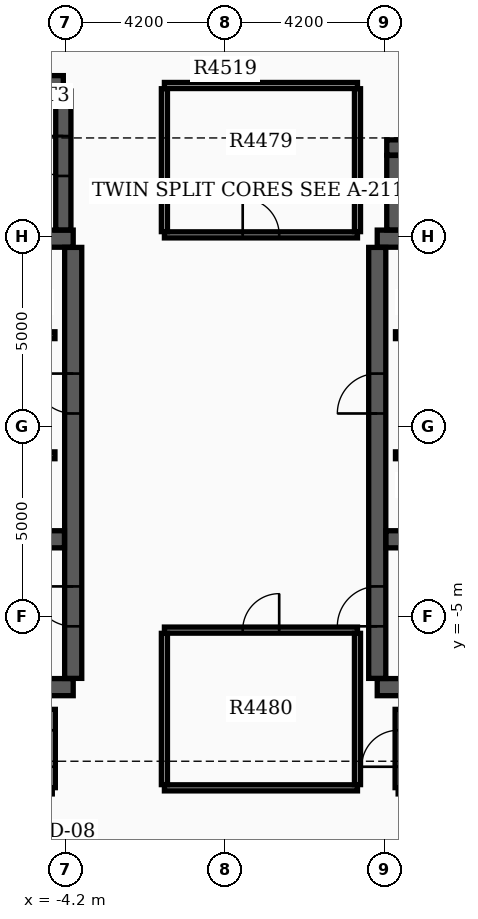
"""IFC4 building model, lengths in metres.
Left out: names, types, materials, properties, quantities, classifications, styles, units other than length and angle.
Written with IfcOpenShell. Run it as: python <this file> out.ifc"""

import sys

from ifc_helpers import new_model, si_unit, direction, frame, frame_2d, origin, place, context, subcontext, project, spatial, rectangle, extrude, element, fill, save


model = new_model("IFC4")
c1 = context("Model", 3, precision=1e-05, world=origin(), true_north=direction((0.0, 1.0)))
c2 = subcontext(c1, "Body", "Model", "MODEL_VIEW")
j1 = project(units=[si_unit("LENGTHUNIT", "METRE"), si_unit("PLANEANGLEUNIT", "RADIAN")], contexts=[c1])
p1 = place(None, origin())
s1 = spatial("IfcSite", under=j1, at=p1, CompositionType="ELEMENT")
p2 = place(p1, origin())
s2 = spatial("IfcBuilding", under=s1, at=p2, CompositionType="ELEMENT")
p3 = place(p2, frame((0.0, 0.0, 281.1)))
s3 = spatial("IfcBuildingStorey", under=s2, at=p3, CompositionType="ELEMENT", Elevation=281.1)
for number, where, z_axis, x_axis in (
    (1, (-12.4, -6.85, 0.0), (0.0, 0.0, 1.0), (1.0, 0.0, 0.0)),
    (2, (-12.4, 4.95, 0.0), (0.0, 0.0, 1.0), (1.0, 0.0, 0.0)),
):
    element("IfcWall", number, at=place(p3, frame(where, z_axis=z_axis, x_axis=x_axis)), inside=s3, PredefinedType="SHEAR", context=c2, shape_type="SweptSolid", body=[
        extrude(rectangle(XDim=8.4, YDim=0.45, at=frame_2d((4.2, 0.0))), origin(), (0.0, 0.0, 1.0), 3.7),
    ])
p4 = place(p3, frame((-4.0, -6.62, 0.0), z_axis=(0.0, 0.0, 1.0), x_axis=(0.0, 1.0, 0.0)))
e3 = element("IfcWall", 3, at=p4, inside=s3, PredefinedType="SHEAR", context=c2, shape_type="SweptSolid", body=[
    extrude(rectangle(XDim=11.34, YDim=0.45, at=frame_2d((5.67, 0.0))), origin(), (0.0, 0.0, 1.0), 3.7),
])
p5 = place(p4, frame((1.37, 0.0, 0.0)))
e4 = element("IfcOpeningElement", 4, at=p5, cuts=e3, PredefinedType="OPENING", context=c2, shape_type="SweptSolid", body=[
    extrude(rectangle(XDim=1.05, YDim=2.15, at=frame_2d((0.525, 1.075))), frame((0.0, 0.235, 0.0), z_axis=(0.0, -1.0, 0.0), x_axis=(1.0, 0.0, 0.0)), (0.0, 0.0, 1.0), 0.47),
])
p6 = place(p4, frame((6.97, 0.0, 0.0)))
e5 = element("IfcOpeningElement", 5, at=p6, cuts=e3, PredefinedType="OPENING", context=c2, shape_type="SweptSolid", body=[
    extrude(rectangle(XDim=1.05, YDim=2.15, at=frame_2d((0.525, 1.075))), frame((0.0, 0.235, 0.0), z_axis=(0.0, -1.0, 0.0), x_axis=(1.0, 0.0, 0.0)), (0.0, 0.0, 1.0), 0.47),
])
p7 = place(p3, frame((-12.17, -2.96, 0.0), z_axis=(0.0, 0.0, 1.0), x_axis=(1.0, 0.0, 0.0)))
e6 = element("IfcWall", 6, at=p7, inside=s3, PredefinedType="SHEAR", context=c2, shape_type="SweptSolid", body=[
    extrude(rectangle(XDim=7.94, YDim=0.45, at=frame_2d((3.97, 0.0))), origin(), (0.0, 0.0, 1.0), 3.7),
])
for number, where, z_axis, x_axis in (
    (7, (4.0, -6.85, 0.0), (0.0, 0.0, 1.0), (1.0, 0.0, 0.0)),
    (8, (4.0, 4.95, 0.0), (0.0, 0.0, 1.0), (1.0, 0.0, 0.0)),
):
    element("IfcWall", number, at=place(p3, frame(where, z_axis=z_axis, x_axis=x_axis)), inside=s3, PredefinedType="SHEAR", context=c2, shape_type="SweptSolid", body=[
        extrude(rectangle(XDim=8.4, YDim=0.45, at=frame_2d((4.2, 0.0))), origin(), (0.0, 0.0, 1.0), 3.7),
    ])
p8 = place(p3, frame((4.0, -6.62, 0.0), z_axis=(0.0, 0.0, 1.0), x_axis=(0.0, 1.0, 0.0)))
e9 = element("IfcWall", 9, at=p8, inside=s3, PredefinedType="SHEAR", context=c2, shape_type="SweptSolid", body=[
    extrude(rectangle(XDim=11.34, YDim=0.45, at=frame_2d((5.67, 0.0))), origin(), (0.0, 0.0, 1.0), 3.7),
])
p9 = place(p8, frame((1.37, 0.0, 0.0)))
e10 = element("IfcOpeningElement", 10, at=p9, cuts=e9, PredefinedType="OPENING", context=c2, shape_type="SweptSolid", body=[
    extrude(rectangle(XDim=1.05, YDim=2.15, at=frame_2d((0.525, 1.075))), frame((0.0, 0.235, 0.0), z_axis=(0.0, -1.0, 0.0), x_axis=(1.0, 0.0, 0.0)), (0.0, 0.0, 1.0), 0.47),
])
p10 = place(p8, frame((6.97, 0.0, 0.0)))
e11 = element("IfcOpeningElement", 11, at=p10, cuts=e9, PredefinedType="OPENING", context=c2, shape_type="SweptSolid", body=[
    extrude(rectangle(XDim=1.05, YDim=2.15, at=frame_2d((0.525, 1.075))), frame((0.0, 0.235, 0.0), z_axis=(0.0, -1.0, 0.0), x_axis=(1.0, 0.0, 0.0)), (0.0, 0.0, 1.0), 0.47),
])
p11 = place(p3, frame((4.23, -2.96, 0.0), z_axis=(0.0, 0.0, 1.0), x_axis=(1.0, 0.0, 0.0)))
e12 = element("IfcWall", 12, at=p11, inside=s3, PredefinedType="SHEAR", context=c2, shape_type="SweptSolid", body=[
    extrude(rectangle(XDim=7.94, YDim=0.45, at=frame_2d((3.97, 0.0))), origin(), (0.0, 0.0, 1.0), 3.7),
])
p12 = place(p3, frame((-12.22, 9.04, 0.0), z_axis=(0.0, 0.0, 1.0), x_axis=(1.0, 0.0, 0.0)))
e13 = element("IfcWall", 13, at=p12, inside=s3, PredefinedType="SHEAR", context=c2, shape_type="SweptSolid", body=[
    extrude(rectangle(XDim=7.96, YDim=0.4, at=frame_2d((3.98, 0.0))), origin(), (0.0, 0.0, 1.0), 3.7),
])
p13 = place(p3, frame((-4.26, 5.18, 0.0), z_axis=(0.0, 0.0, 1.0), x_axis=(0.0, 1.0, 0.0)))
e14 = element("IfcWall", 14, at=p13, inside=s3, PredefinedType="SHEAR", context=c2, shape_type="SweptSolid", body=[
    extrude(rectangle(XDim=3.655, YDim=0.4, at=frame_2d((1.828, 0.0))), origin(), (0.0, 0.0, 1.0), 3.7),
])
p14 = place(p13, frame((1.42, 0.0, 0.0)))
e15 = element("IfcOpeningElement", 15, at=p14, cuts=e14, PredefinedType="OPENING", context=c2, shape_type="SweptSolid", body=[
    extrude(rectangle(XDim=1.05, YDim=2.15, at=frame_2d((0.525, 1.075))), frame((0.0, 0.21, 0.0), z_axis=(0.0, -1.0, 0.0), x_axis=(1.0, 0.0, 0.0)), (0.0, 0.0, 1.0), 0.42),
])
p15 = place(p3, frame((4.45, 5.18, 0.0), z_axis=(0.0, 0.0, 1.0), x_axis=(0.0, 1.0, 0.0)))
e16 = element("IfcWall", 16, at=p15, inside=s3, PredefinedType="SHEAR", context=c2, shape_type="SweptSolid", body=[
    extrude(rectangle(XDim=1.96, YDim=0.4, at=frame_2d((0.98, 0.0))), origin(), (0.0, 0.0, 1.0), 3.7),
])
p16 = place(p3, frame((4.25, 7.35, 0.0), z_axis=(0.0, 0.0, 1.0), x_axis=(1.0, 0.0, 0.0)))
e17 = element("IfcWall", 17, at=p16, inside=s3, PredefinedType="SHEAR", context=c2, shape_type="SweptSolid", body=[
    extrude(rectangle(XDim=5.4, YDim=0.4, at=frame_2d((2.7, 0.0))), origin(), (0.0, 0.0, 1.0), 3.7),
])
p17 = place(p3, frame((-11.9, 2.41, 0.0), z_axis=(0.0, 0.0, 1.0), x_axis=(1.0, 0.0, 0.0)))
e18 = element("IfcWall", 18, at=p17, inside=s3, PredefinedType="SOLIDWALL", context=c2, shape_type="SweptSolid", body=[
    extrude(rectangle(XDim=7.42, YDim=0.18, at=frame_2d((3.71, 0.0))), origin(), (0.0, 0.0, 1.0), 3.17),
])
p18 = place(p17, frame((0.55, 0.0, 0.0)))
e19 = element("IfcOpeningElement", 19, at=p18, cuts=e18, PredefinedType="OPENING", context=c2, shape_type="SweptSolid", body=[
    extrude(rectangle(XDim=1.1, YDim=2.15, at=frame_2d((0.55, 1.075))), frame((0.0, 0.1, 0.0), z_axis=(0.0, -1.0, 0.0), x_axis=(1.0, 0.0, 0.0)), (0.0, 0.0, 1.0), 0.2),
])
p19 = place(p17, frame((4.9, 0.0, 0.0)))
e20 = element("IfcOpeningElement", 20, at=p19, cuts=e18, PredefinedType="OPENING", context=c2, shape_type="SweptSolid", body=[
    extrude(rectangle(XDim=0.88, YDim=2.1, at=frame_2d((0.44, 1.05))), frame((0.0, 0.1, 0.0), z_axis=(0.0, -1.0, 0.0), x_axis=(1.0, 0.0, 0.0)), (0.0, 0.0, 1.0), 0.2),
])
p20 = place(p3, frame((4.48, 2.41, 0.0), z_axis=(0.0, 0.0, 1.0), x_axis=(1.0, 0.0, 0.0)))
e21 = element("IfcWall", 21, at=p20, inside=s3, PredefinedType="SOLIDWALL", context=c2, shape_type="SweptSolid", body=[
    extrude(rectangle(XDim=7.42, YDim=0.18, at=frame_2d((3.71, 0.0))), origin(), (0.0, 0.0, 1.0), 3.17),
])
p21 = place(p20, frame((5.67, 0.0, 0.0)))
e22 = element("IfcOpeningElement", 22, at=p21, cuts=e21, PredefinedType="OPENING", context=c2, shape_type="SweptSolid", body=[
    extrude(rectangle(XDim=1.1, YDim=2.15, at=frame_2d((0.55, 1.075))), frame((0.0, 0.1, 0.0), z_axis=(0.0, -1.0, 0.0), x_axis=(1.0, 0.0, 0.0)), (0.0, 0.0, 1.0), 0.2),
])
p22 = place(p20, frame((1.6, 0.0, 0.0)))
e23 = element("IfcOpeningElement", 23, at=p22, cuts=e21, PredefinedType="OPENING", context=c2, shape_type="SweptSolid", body=[
    extrude(rectangle(XDim=0.88, YDim=2.1, at=frame_2d((0.44, 1.05))), frame((0.0, 0.1, 0.0), z_axis=(0.0, -1.0, 0.0), x_axis=(1.0, 0.0, 0.0)), (0.0, 0.0, 1.0), 0.2),
])
p23 = place(p3, frame((-11.9, -0.75, 0.0), z_axis=(0.0, 0.0, 1.0), x_axis=(1.0, 0.0, 0.0)))
e24 = element("IfcWall", 24, at=p23, inside=s3, PredefinedType="SOLIDWALL", context=c2, shape_type="SweptSolid", body=[
    extrude(rectangle(XDim=7.42, YDim=0.18, at=frame_2d((3.71, 0.0))), origin(), (0.0, 0.0, 1.0), 3.17),
])
p24 = place(p23, frame((5.75, 0.0, 0.0)))
e25 = element("IfcOpeningElement", 25, at=p24, cuts=e24, PredefinedType="OPENING", context=c2, shape_type="SweptSolid", body=[
    extrude(rectangle(XDim=1.1, YDim=2.15, at=frame_2d((0.55, 1.075))), frame((0.0, 0.1, 0.0), z_axis=(0.0, -1.0, 0.0), x_axis=(1.0, 0.0, 0.0)), (0.0, 0.0, 1.0), 0.2),
])
p25 = place(p23, frame((1.6, 0.0, 0.0)))
e26 = element("IfcOpeningElement", 26, at=p25, cuts=e24, PredefinedType="OPENING", context=c2, shape_type="SweptSolid", body=[
    extrude(rectangle(XDim=0.88, YDim=2.1, at=frame_2d((0.44, 1.05))), frame((0.0, 0.1, 0.0), z_axis=(0.0, -1.0, 0.0), x_axis=(1.0, 0.0, 0.0)), (0.0, 0.0, 1.0), 0.2),
])
p26 = place(p3, frame((4.48, -0.75, 0.0), z_axis=(0.0, 0.0, 1.0), x_axis=(1.0, 0.0, 0.0)))
e27 = element("IfcWall", 27, at=p26, inside=s3, PredefinedType="SOLIDWALL", context=c2, shape_type="SweptSolid", body=[
    extrude(rectangle(XDim=7.42, YDim=0.18, at=frame_2d((3.71, 0.0))), origin(), (0.0, 0.0, 1.0), 3.17),
])
p27 = place(p26, frame((3.92, 0.0, 0.0)))
e28 = element("IfcOpeningElement", 28, at=p27, cuts=e27, PredefinedType="OPENING", context=c2, shape_type="SweptSolid", body=[
    extrude(rectangle(XDim=1.1, YDim=2.15, at=frame_2d((0.55, 1.075))), frame((0.0, 0.1, 0.0), z_axis=(0.0, -1.0, 0.0), x_axis=(1.0, 0.0, 0.0)), (0.0, 0.0, 1.0), 0.2),
])
p28 = place(p26, frame((5.82, 0.0, 0.0)))
e29 = element("IfcOpeningElement", 29, at=p28, cuts=e27, PredefinedType="OPENING", context=c2, shape_type="SweptSolid", body=[
    extrude(rectangle(XDim=1.1, YDim=2.15, at=frame_2d((0.55, 1.075))), frame((0.0, 0.1, 0.0), z_axis=(0.0, -1.0, 0.0), x_axis=(1.0, 0.0, 0.0)), (0.0, 0.0, 1.0), 0.2),
])
p29 = place(p26, frame((1.6, 0.0, 0.0)))
e30 = element("IfcOpeningElement", 30, at=p29, cuts=e27, PredefinedType="OPENING", context=c2, shape_type="SweptSolid", body=[
    extrude(rectangle(XDim=0.88, YDim=2.1, at=frame_2d((0.44, 1.05))), frame((0.0, 0.1, 0.0), z_axis=(0.0, -1.0, 0.0), x_axis=(1.0, 0.0, 0.0)), (0.0, 0.0, 1.0), 0.2),
])
p30 = place(p3, frame((-1.6, 5.05, 0.0), z_axis=(0.0, 0.0, 1.0), x_axis=(1.0, 0.0, 0.0)))
e31 = element("IfcWall", 31, at=p30, inside=s3, PredefinedType="PARTITIONING", context=c2, shape_type="SweptSolid", body=[
    extrude(rectangle(XDim=5.08, YDim=0.16, at=frame_2d((2.54, 0.0))), origin(), (0.0, 0.0, 1.0), 3.17),
])
p31 = place(p30, frame((2.06, 0.0, 0.0)))
e32 = element("IfcOpeningElement", 32, at=p31, cuts=e31, PredefinedType="OPENING", context=c2, shape_type="SweptSolid", body=[
    extrude(rectangle(XDim=0.96, YDim=2.15, at=frame_2d((0.48, 1.075))), frame((0.0, 0.09, 0.0), z_axis=(0.0, -1.0, 0.0), x_axis=(1.0, 0.0, 0.0)), (0.0, 0.0, 1.0), 0.18),
])
p32 = place(p3, frame((-1.6, 8.98, 0.0), z_axis=(0.0, 0.0, 1.0), x_axis=(1.0, 0.0, 0.0)))
e33 = element("IfcWall", 33, at=p32, inside=s3, PredefinedType="PARTITIONING", context=c2, shape_type="SweptSolid", body=[
    extrude(rectangle(XDim=5.08, YDim=0.16, at=frame_2d((2.54, 0.0))), origin(), (0.0, 0.0, 1.0), 3.17),
])
for number, where, z_axis, x_axis in (
    (34, (-1.6, 5.135, 0.0), (0.0, 0.0, 1.0), (0.0, 1.0, 0.0)),
    (35, (3.48, 5.135, 0.0), (0.0, 0.0, 1.0), (0.0, 1.0, 0.0)),
):
    element("IfcWall", number, at=place(p3, frame(where, z_axis=z_axis, x_axis=x_axis)), inside=s3, PredefinedType="PARTITIONING", context=c2, shape_type="SweptSolid", body=[
        extrude(rectangle(XDim=3.76, YDim=0.16, at=frame_2d((1.88, 0.0))), origin(), (0.0, 0.0, 1.0), 3.17),
    ])
p33 = place(p3, frame((-1.6, -9.5, 0.0), z_axis=(0.0, 0.0, 1.0), x_axis=(1.0, 0.0, 0.0)))
e36 = element("IfcWall", 36, at=p33, inside=s3, PredefinedType="PARTITIONING", context=c2, shape_type="SweptSolid", body=[
    extrude(rectangle(XDim=5.08, YDim=0.16, at=frame_2d((2.54, 0.0))), origin(), (0.0, 0.0, 1.0), 3.17),
])
p34 = place(p3, frame((-1.6, -5.35, 0.0), z_axis=(0.0, 0.0, 1.0), x_axis=(1.0, 0.0, 0.0)))
e37 = element("IfcWall", 37, at=p34, inside=s3, PredefinedType="PARTITIONING", context=c2, shape_type="SweptSolid", body=[
    extrude(rectangle(XDim=5.08, YDim=0.16, at=frame_2d((2.54, 0.0))), origin(), (0.0, 0.0, 1.0), 3.17),
])
p35 = place(p34, frame((2.06, 0.0, 0.0)))
e38 = element("IfcOpeningElement", 38, at=p35, cuts=e37, PredefinedType="OPENING", context=c2, shape_type="SweptSolid", body=[
    extrude(rectangle(XDim=0.96, YDim=2.15, at=frame_2d((0.48, 1.075))), frame((0.0, 0.09, 0.0), z_axis=(0.0, -1.0, 0.0), x_axis=(1.0, 0.0, 0.0)), (0.0, 0.0, 1.0), 0.18),
])
for number, where, z_axis, x_axis in (
    (39, (-1.6, -9.415, 0.0), (0.0, 0.0, 1.0), (0.0, 1.0, 0.0)),
    (40, (3.48, -9.415, 0.0), (0.0, 0.0, 1.0), (0.0, 1.0, 0.0)),
):
    element("IfcWall", number, at=place(p3, frame(where, z_axis=z_axis, x_axis=x_axis)), inside=s3, PredefinedType="PARTITIONING", context=c2, shape_type="SweptSolid", body=[
        extrude(rectangle(XDim=3.98, YDim=0.16, at=frame_2d((1.99, 0.0))), origin(), (0.0, 0.0, 1.0), 3.17),
    ])
p36 = place(p3, frame((4.55, -9.58, 0.0), z_axis=(0.0, 0.0, 1.0), x_axis=(1.0, 0.0, 0.0)))
e41 = element("IfcWall", 41, at=p36, inside=s3, PredefinedType="PARTITIONING", context=c2, shape_type="SweptSolid", body=[
    extrude(rectangle(XDim=8.1, YDim=0.16, at=frame_2d((4.05, 0.0))), origin(), (0.0, 0.0, 1.0), 3.17),
])
p37 = place(p3, frame((4.55, -9.495, 0.0), z_axis=(0.0, 0.0, 1.0), x_axis=(0.0, 1.0, 0.0)))
e42 = element("IfcWall", 42, at=p37, inside=s3, PredefinedType="PARTITIONING", context=c2, shape_type="SweptSolid", body=[
    extrude(rectangle(XDim=2.06, YDim=0.16, at=frame_2d((1.03, 0.0))), origin(), (0.0, 0.0, 1.0), 3.17),
])
p38 = place(p37, frame((0.55, 0.0, 0.0)))
e43 = element("IfcOpeningElement", 43, at=p38, cuts=e42, PredefinedType="OPENING", context=c2, shape_type="SweptSolid", body=[
    extrude(rectangle(XDim=0.96, YDim=2.15, at=frame_2d((0.48, 1.075))), frame((0.0, 0.09, 0.0), z_axis=(0.0, -1.0, 0.0), x_axis=(1.0, 0.0, 0.0)), (0.0, 0.0, 1.0), 0.18),
])
p39 = place(p3, frame((-4.55, -9.495, 0.0), z_axis=(0.0, 0.0, 1.0), x_axis=(0.0, 1.0, 0.0)))
e44 = element("IfcWall", 44, at=p39, inside=s3, PredefinedType="PARTITIONING", context=c2, shape_type="SweptSolid", body=[
    extrude(rectangle(XDim=2.06, YDim=0.16, at=frame_2d((1.03, 0.0))), origin(), (0.0, 0.0, 1.0), 3.17),
])
p40 = place(p39, frame((0.55, 0.0, 0.0)))
e45 = element("IfcOpeningElement", 45, at=p40, cuts=e44, PredefinedType="OPENING", context=c2, shape_type="SweptSolid", body=[
    extrude(rectangle(XDim=0.96, YDim=2.15, at=frame_2d((0.48, 1.075))), frame((0.0, 0.09, 0.0), z_axis=(0.0, -1.0, 0.0), x_axis=(1.0, 0.0, 0.0)), (0.0, 0.0, 1.0), 0.18),
])
p41 = place(p5, origin())
e46 = element("IfcDoor", 46, at=p41, inside=s3, OperationType="SINGLE_SWING_RIGHT", PredefinedType="DOOR", context=c2, shape_type="SweptSolid", body=[
    extrude(rectangle(XDim=1.05, YDim=2.15, at=frame_2d((0.525, 1.075))), frame((0.0, 0.025, 0.0), z_axis=(0.0, -1.0, 0.0), x_axis=(1.0, 0.0, 0.0)), (0.0, 0.0, 1.0), 0.05),
])
fill(e4, e46)
p42 = place(p9, origin())
e47 = element("IfcDoor", 47, at=p42, inside=s3, OperationType="SINGLE_SWING_LEFT", PredefinedType="DOOR", context=c2, shape_type="SweptSolid", body=[
    extrude(rectangle(XDim=1.05, YDim=2.15, at=frame_2d((0.525, 1.075))), frame((0.0, 0.025, 0.0), z_axis=(0.0, -1.0, 0.0), x_axis=(1.0, 0.0, 0.0)), (0.0, 0.0, 1.0), 0.05),
])
fill(e10, e47)
p43 = place(p6, origin())
e48 = element("IfcDoor", 48, at=p43, inside=s3, OperationType="SINGLE_SWING_RIGHT", PredefinedType="DOOR", context=c2, shape_type="SweptSolid", body=[
    extrude(rectangle(XDim=1.05, YDim=2.15, at=frame_2d((0.525, 1.075))), frame((0.0, 0.025, 0.0), z_axis=(0.0, -1.0, 0.0), x_axis=(1.0, 0.0, 0.0)), (0.0, 0.0, 1.0), 0.05),
])
fill(e5, e48)
p44 = place(p10, origin())
e49 = element("IfcDoor", 49, at=p44, inside=s3, OperationType="SINGLE_SWING_LEFT", PredefinedType="DOOR", context=c2, shape_type="SweptSolid", body=[
    extrude(rectangle(XDim=1.05, YDim=2.15, at=frame_2d((0.525, 1.075))), frame((0.0, 0.025, 0.0), z_axis=(0.0, -1.0, 0.0), x_axis=(1.0, 0.0, 0.0)), (0.0, 0.0, 1.0), 0.05),
])
fill(e11, e49)
p45 = place(p14, origin())
e50 = element("IfcDoor", 50, at=p45, inside=s3, OperationType="SINGLE_SWING_RIGHT", PredefinedType="DOOR", context=c2, shape_type="SweptSolid", body=[
    extrude(rectangle(XDim=1.05, YDim=2.15, at=frame_2d((0.525, 1.075))), frame((0.0, 0.025, 0.0), z_axis=(0.0, -1.0, 0.0), x_axis=(1.0, 0.0, 0.0)), (0.0, 0.0, 1.0), 0.05),
])
fill(e15, e50)
p46 = place(p31, origin())
e51 = element("IfcDoor", 51, at=p46, inside=s3, OperationType="SINGLE_SWING_LEFT", PredefinedType="DOOR", context=c2, shape_type="SweptSolid", body=[
    extrude(rectangle(XDim=0.96, YDim=2.15, at=frame_2d((0.48, 1.075))), frame((0.0, 0.025, 0.0), z_axis=(0.0, -1.0, 0.0), x_axis=(1.0, 0.0, 0.0)), (0.0, 0.0, 1.0), 0.05),
])
fill(e32, e51)
p47 = place(p35, origin())
e52 = element("IfcDoor", 52, at=p47, inside=s3, OperationType="SINGLE_SWING_RIGHT", PredefinedType="DOOR", context=c2, shape_type="SweptSolid", body=[
    extrude(rectangle(XDim=0.96, YDim=2.15, at=frame_2d((0.48, 1.075))), frame((0.0, 0.025, 0.0), z_axis=(0.0, -1.0, 0.0), x_axis=(1.0, 0.0, 0.0)), (0.0, 0.0, 1.0), 0.05),
])
fill(e38, e52)
p48 = place(p38, origin())
e53 = element("IfcDoor", 53, at=p48, inside=s3, OperationType="SINGLE_SWING_LEFT", PredefinedType="DOOR", context=c2, shape_type="SweptSolid", body=[
    extrude(rectangle(XDim=0.96, YDim=2.15, at=frame_2d((0.48, 1.075))), frame((0.0, 0.025, 0.0), z_axis=(0.0, -1.0, 0.0), x_axis=(1.0, 0.0, 0.0)), (0.0, 0.0, 1.0), 0.05),
])
fill(e43, e53)
p49 = place(p40, origin())
e54 = element("IfcDoor", 54, at=p49, inside=s3, OperationType="SINGLE_SWING_RIGHT", PredefinedType="DOOR", context=c2, shape_type="SweptSolid", body=[
    extrude(rectangle(XDim=0.96, YDim=2.15, at=frame_2d((0.48, 1.075))), frame((0.0, 0.025, 0.0), z_axis=(0.0, -1.0, 0.0), x_axis=(1.0, 0.0, 0.0)), (0.0, 0.0, 1.0), 0.05),
])
fill(e45, e54)
save(model, sys.argv[1])
